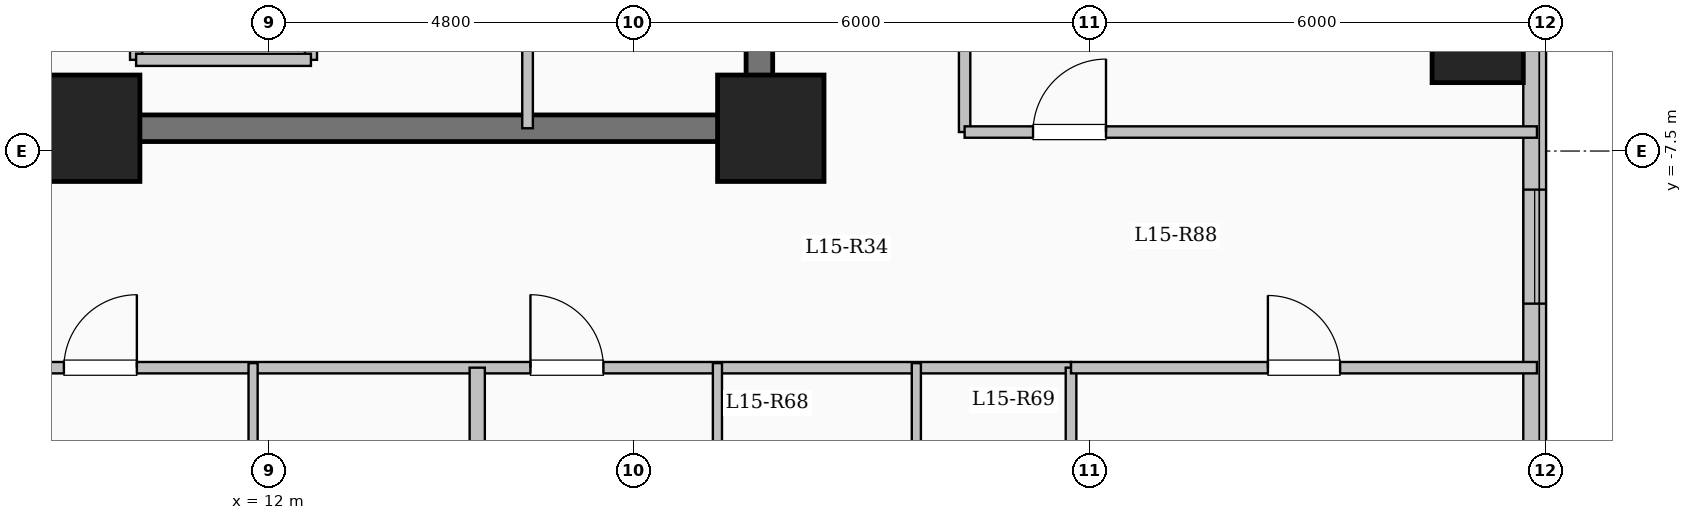
"""IFC4 building model, lengths in metres.
Left out: names, types, materials, properties, quantities, classifications, styles, units other than length and angle.
Written with IfcOpenShell. Run it as: python <this file> out.ifc"""

import sys

from ifc_helpers import new_model, si_unit, direction, frame, frame_2d, origin, origin_2d, place, context, subcontext, project, spatial, rectangle, extrude, element, fill, save


model = new_model("IFC4")
c1 = context("Model", 3, precision=1e-05, world=origin(), true_north=direction((0.0, 1.0)))
c2 = subcontext(c1, "Body", "Model", "MODEL_VIEW")
j1 = project(units=[si_unit("LENGTHUNIT", "METRE"), si_unit("PLANEANGLEUNIT", "RADIAN")], contexts=[c1])
p1 = place(None, origin())
s1 = spatial("IfcSite", under=j1, at=p1, CompositionType="ELEMENT")
p2 = place(p1, origin())
s2 = spatial("IfcBuilding", under=s1, at=p2, CompositionType="ELEMENT")
p3 = place(p2, frame((0.0, 0.0, 57.5)))
s3 = spatial("IfcBuildingStorey", under=s2, at=p3, CompositionType="ELEMENT", Elevation=57.5)
for number, where, z_axis, x_axis in (
    (1, (9.6, -7.2, 0.0), (0.0, 0.0, 1.0), (1.0, 0.0, 0.0)),
    (2, (18.6, -7.2, 0.0), (0.0, 0.0, 1.0), (1.0, 0.0, 0.0)),
):
    element("IfcColumn", number, at=place(p3, frame(where, z_axis=z_axis, x_axis=x_axis)), inside=s3, PredefinedType="COLUMN", context=c2, shape_type="SweptSolid", body=[
        extrude(rectangle(XDim=1.4, YDim=1.4, at=origin_2d()), origin(), (0.0, 0.0, 1.0), 3.35),
    ])
p4 = place(p3, frame((27.9, -6.0, 0.0), z_axis=(0.0, 0.0, 1.0), x_axis=(1.0, 0.0, 0.0)))
e3 = element("IfcColumn", 3, at=p4, inside=s3, PredefinedType="COLUMN", context=c2, shape_type="SweptSolid", body=[
    extrude(rectangle(XDim=1.2, YDim=1.2, at=origin_2d()), origin(), (0.0, 0.0, 1.0), 3.35),
])
p5 = place(p3, frame((28.65, 19.05, 0.0), z_axis=(0.0, 0.0, 1.0), x_axis=(0.0, -1.0, 0.0)))
e4 = element("IfcWall", 4, at=p5, inside=s3, PredefinedType="SOLIDWALL", context=c2, shape_type="SweptSolid", body=[
    extrude(rectangle(XDim=38.1, YDim=0.3, at=frame_2d((19.05, 0.0))), origin(), (0.0, 0.0, 1.0), 3.1),
])
p6 = place(p5, frame((2.275, 0.0, 0.9)))
e5 = element("IfcOpeningElement", 5, at=p6, cuts=e4, PredefinedType="OPENING", context=c2, shape_type="SweptSolid", body=[
    extrude(rectangle(XDim=2.0, YDim=1.7, at=frame_2d((1.0, 0.85))), frame((0.0, 0.16, 0.0), z_axis=(0.0, -1.0, 0.0), x_axis=(1.0, 0.0, 0.0)), (0.0, 0.0, 1.0), 0.32),
])
p7 = place(p5, frame((6.925, 0.0, 0.95)))
e6 = element("IfcOpeningElement", 6, at=p7, cuts=e4, PredefinedType="OPENING", context=c2, shape_type="SweptSolid", body=[
    extrude(rectangle(XDim=1.0, YDim=1.5, at=frame_2d((0.5, 0.75))), frame((0.0, 0.16, 0.0), z_axis=(0.0, -1.0, 0.0), x_axis=(1.0, 0.0, 0.0)), (0.0, 0.0, 1.0), 0.32),
])
p8 = place(p5, frame((10.175, 0.0, 0.9)))
e7 = element("IfcOpeningElement", 7, at=p8, cuts=e4, PredefinedType="OPENING", context=c2, shape_type="SweptSolid", body=[
    extrude(rectangle(XDim=2.0, YDim=1.7, at=frame_2d((1.0, 0.85))), frame((0.0, 0.16, 0.0), z_axis=(0.0, -1.0, 0.0), x_axis=(1.0, 0.0, 0.0)), (0.0, 0.0, 1.0), 0.32),
])
p9 = place(p5, frame((14.925, 0.0, 0.9)))
e8 = element("IfcOpeningElement", 8, at=p9, cuts=e4, PredefinedType="OPENING", context=c2, shape_type="SweptSolid", body=[
    extrude(rectangle(XDim=1.8, YDim=1.65, at=frame_2d((0.9, 0.825))), frame((0.0, 0.16, 0.0), z_axis=(0.0, -1.0, 0.0), x_axis=(1.0, 0.0, 0.0)), (0.0, 0.0, 1.0), 0.32),
])
p10 = place(p5, frame((20.75, 0.0, 0.9)))
e9 = element("IfcOpeningElement", 9, at=p10, cuts=e4, PredefinedType="OPENING", context=c2, shape_type="SweptSolid", body=[
    extrude(rectangle(XDim=2.4, YDim=1.8, at=frame_2d((1.2, 0.9))), frame((0.0, 0.16, 0.0), z_axis=(0.0, -1.0, 0.0), x_axis=(1.0, 0.0, 0.0)), (0.0, 0.0, 1.0), 0.32),
])
p11 = place(p5, frame((27.058, 0.0, 0.9)))
e10 = element("IfcOpeningElement", 10, at=p11, cuts=e4, PredefinedType="OPENING", context=c2, shape_type="SweptSolid", body=[
    extrude(rectangle(XDim=1.5, YDim=1.65, at=frame_2d((0.75, 0.825))), frame((0.0, 0.16, 0.0), z_axis=(0.0, -1.0, 0.0), x_axis=(1.0, 0.0, 0.0)), (0.0, 0.0, 1.0), 0.32),
])
p12 = place(p5, frame((32.55, 0.0, 0.9)))
e11 = element("IfcOpeningElement", 11, at=p12, cuts=e4, PredefinedType="OPENING", context=c2, shape_type="SweptSolid", body=[
    extrude(rectangle(XDim=2.4, YDim=1.8, at=frame_2d((1.2, 0.9))), frame((0.0, 0.16, 0.0), z_axis=(0.0, -1.0, 0.0), x_axis=(1.0, 0.0, 0.0)), (0.0, 0.0, 1.0), 0.32),
])
for number, where, z_axis, x_axis in (
    (12, (10.25, -6.3, 0.0), (0.0, 0.0, 1.0), (0.0, 1.0, 0.0)),
    (13, (12.55, -6.3, 0.0), (0.0, 0.0, 1.0), (0.0, 1.0, 0.0)),
):
    element("IfcWall", number, at=place(p3, frame(where, z_axis=z_axis, x_axis=x_axis)), inside=s3, PredefinedType="SOLIDWALL", context=c2, shape_type="SweptSolid", body=[
        extrude(rectangle(XDim=2.6, YDim=0.16, at=frame_2d((1.3, 0.0))), origin(), (0.0, 0.0, 1.0), 3.1),
    ])
p13 = place(p3, frame((10.25, -6.3, 0.0), z_axis=(0.0, 0.0, 1.0), x_axis=(1.0, 0.0, 0.0)))
e14 = element("IfcWall", 14, at=p13, inside=s3, PredefinedType="SOLIDWALL", context=c2, shape_type="SweptSolid", body=[
    extrude(rectangle(XDim=2.3, YDim=0.16, at=frame_2d((1.15, 0.0))), origin(), (0.0, 0.0, 1.0), 3.1),
])
p14 = place(p3, frame((18.45, -7.375, 0.0), z_axis=(0.0, 0.0, 1.0), x_axis=(0.0, 1.0, 0.0)))
e15 = element("IfcWall", 15, at=p14, inside=s3, PredefinedType="SHEAR", context=c2, shape_type="SweptSolid", body=[
    extrude(rectangle(XDim=14.05, YDim=0.35, at=frame_2d((7.025, 0.0))), origin(), (0.0, 0.0, 1.0), 3.35),
])
p15 = place(p3, frame((10.075, -7.2, 0.0), z_axis=(0.0, 0.0, 1.0), x_axis=(1.0, 0.0, 0.0)))
e16 = element("IfcWall", 16, at=p15, inside=s3, PredefinedType="SHEAR", context=c2, shape_type="SweptSolid", body=[
    extrude(rectangle(XDim=8.55, YDim=0.35, at=frame_2d((4.275, 0.0))), origin(), (0.0, 0.0, 1.0), 3.35),
])
p16 = place(p3, frame((15.4, -7.2, 0.0), z_axis=(0.0, 0.0, 1.0), x_axis=(0.0, 1.0, 0.0)))
e17 = element("IfcWall", 17, at=p16, inside=s3, PredefinedType="PARTITIONING", context=c2, shape_type="SweptSolid", body=[
    extrude(rectangle(XDim=10.45, YDim=0.14, at=frame_2d((5.225, 0.0))), origin(), (0.0, 0.0, 1.0), 3.1),
])
p17 = place(p16, frame((9.25, 0.0, 0.0)))
e18 = element("IfcOpeningElement", 18, at=p17, cuts=e17, PredefinedType="OPENING", context=c2, shape_type="SweptSolid", body=[
    extrude(rectangle(XDim=0.9, YDim=2.08, at=frame_2d((0.45, 1.04))), frame((0.0, 0.08, 0.0), z_axis=(0.0, -1.0, 0.0), x_axis=(1.0, 0.0, 0.0)), (0.0, 0.0, 1.0), 0.16),
])
p18 = place(p3, frame((21.15, -7.25, 0.0), z_axis=(0.0, 0.0, 1.0), x_axis=(0.0, 1.0, 0.0)))
e19 = element("IfcWall", 19, at=p18, inside=s3, PredefinedType="PARTITIONING", context=c2, shape_type="SweptSolid", body=[
    extrude(rectangle(XDim=18.0, YDim=0.15, at=frame_2d((9.0, 0.0))), origin(), (0.0, 0.0, 1.0), 2.585),
])
p19 = place(p3, frame((8.55, -10.35, 0.0), z_axis=(0.0, 0.0, 1.0), x_axis=(1.0, 0.0, 0.0)))
e20 = element("IfcWall", 20, at=p19, inside=s3, PredefinedType="PARTITIONING", context=c2, shape_type="SweptSolid", body=[
    extrude(rectangle(XDim=14.0, YDim=0.15, at=frame_2d((7.0, 0.0))), origin(), (0.0, 0.0, 1.0), 3.1),
])
p20 = place(p19, frame((0.75, 0.0, 0.0)))
e21 = element("IfcOpeningElement", 21, at=p20, cuts=e20, PredefinedType="OPENING", context=c2, shape_type="SweptSolid", body=[
    extrude(rectangle(XDim=0.96, YDim=2.15, at=frame_2d((0.48, 1.075))), frame((0.0, 0.085, 0.0), z_axis=(0.0, -1.0, 0.0), x_axis=(1.0, 0.0, 0.0)), (0.0, 0.0, 1.0), 0.17),
])
p21 = place(p19, frame((6.888, 0.0, 0.0)))
e22 = element("IfcOpeningElement", 22, at=p21, cuts=e20, PredefinedType="OPENING", context=c2, shape_type="SweptSolid", body=[
    extrude(rectangle(XDim=0.96, YDim=2.15, at=frame_2d((0.48, 1.075))), frame((0.0, 0.085, 0.0), z_axis=(0.0, -1.0, 0.0), x_axis=(1.0, 0.0, 0.0)), (0.0, 0.0, 1.0), 0.17),
])
p22 = place(p3, frame((14.738, -23.6, 0.0), z_axis=(0.0, 0.0, 1.0), x_axis=(0.0, 1.0, 0.0)))
e23 = element("IfcWall", 23, at=p22, inside=s3, PredefinedType="SOLIDWALL", context=c2, shape_type="SweptSolid", body=[
    extrude(rectangle(XDim=13.25, YDim=0.2, at=frame_2d((6.625, 0.0))), origin(), (0.0, 0.0, 1.0), 2.435),
])
p23 = place(p3, frame((11.789, -13.51, 0.0), z_axis=(0.0, 0.0, 1.0), x_axis=(0.0, 1.0, 0.0)))
e24 = element("IfcWall", 24, at=p23, inside=s3, PredefinedType="PARTITIONING", context=c2, shape_type="SweptSolid", body=[
    extrude(rectangle(XDim=3.22, YDim=0.12, at=frame_2d((1.61, 0.0))), origin(), (0.0, 0.0, 1.0), 3.1),
])
p24 = place(p23, frame((1.14, 0.0, 0.0)))
e25 = element("IfcOpeningElement", 25, at=p24, cuts=e24, PredefinedType="OPENING", context=c2, shape_type="SweptSolid", body=[
    extrude(rectangle(XDim=0.88, YDim=2.1, at=frame_2d((0.44, 1.05))), frame((0.0, 0.07, 0.0), z_axis=(0.0, -1.0, 0.0), x_axis=(1.0, 0.0, 0.0)), (0.0, 0.0, 1.0), 0.14),
])
p25 = place(p3, frame((17.898, -23.6, 0.0), z_axis=(0.0, 0.0, 1.0), x_axis=(0.0, 1.0, 0.0)))
e26 = element("IfcWall", 26, at=p25, inside=s3, PredefinedType="PARTITIONING", context=c2, shape_type="SweptSolid", body=[
    extrude(rectangle(XDim=13.31, YDim=0.12, at=frame_2d((6.655, 0.0))), origin(), (0.0, 0.0, 1.0), 3.1),
])
p26 = place(p25, frame((9.485, 0.0, 0.0)))
e27 = element("IfcOpeningElement", 27, at=p26, cuts=e26, PredefinedType="OPENING", context=c2, shape_type="SweptSolid", body=[
    extrude(rectangle(XDim=1.08, YDim=2.15, at=frame_2d((0.54, 1.075))), frame((0.0, 0.07, 0.0), z_axis=(0.0, -1.0, 0.0), x_axis=(1.0, 0.0, 0.0)), (0.0, 0.0, 1.0), 0.14),
])
p27 = place(p3, frame((20.515, -12.75, 0.0), z_axis=(0.0, 0.0, 1.0), x_axis=(0.0, 1.0, 0.0)))
e28 = element("IfcWall", 28, at=p27, inside=s3, PredefinedType="PARTITIONING", context=c2, shape_type="SweptSolid", body=[
    extrude(rectangle(XDim=2.46, YDim=0.12, at=frame_2d((1.23, 0.0))), origin(), (0.0, 0.0, 1.0), 3.1),
])
p28 = place(p3, frame((21.15, -7.25, 0.0), z_axis=(0.0, 0.0, 1.0), x_axis=(1.0, 0.0, 0.0)))
e29 = element("IfcWall", 29, at=p28, inside=s3, PredefinedType="PARTITIONING", context=c2, shape_type="SweptSolid", body=[
    extrude(rectangle(XDim=7.53, YDim=0.15, at=frame_2d((3.765, 0.0))), origin(), (0.0, 0.0, 1.0), 3.1),
])
p29 = place(p28, frame((0.9, 0.0, 0.0)))
e30 = element("IfcOpeningElement", 30, at=p29, cuts=e29, PredefinedType="OPENING", context=c2, shape_type="SweptSolid", body=[
    extrude(rectangle(XDim=0.96, YDim=2.15, at=frame_2d((0.48, 1.075))), frame((0.0, 0.085, 0.0), z_axis=(0.0, -1.0, 0.0), x_axis=(1.0, 0.0, 0.0)), (0.0, 0.0, 1.0), 0.17),
])
p30 = place(p3, frame((22.55, -19.05, 0.0), z_axis=(0.0, 0.0, 1.0), x_axis=(0.0, 1.0, 0.0)))
e31 = element("IfcWall", 31, at=p30, inside=s3, PredefinedType="PARTITIONING", context=c2, shape_type="SweptSolid", body=[
    extrude(rectangle(XDim=8.7, YDim=0.14, at=frame_2d((4.35, 0.0))), origin(), (0.0, 0.0, 1.0), 3.1),
])
p31 = place(p3, frame((22.55, -10.35, 0.0), z_axis=(0.0, 0.0, 1.0), x_axis=(1.0, 0.0, 0.0)))
e32 = element("IfcWall", 32, at=p31, inside=s3, PredefinedType="PARTITIONING", context=c2, shape_type="SweptSolid", body=[
    extrude(rectangle(XDim=6.13, YDim=0.15, at=frame_2d((3.065, 0.0))), origin(), (0.0, 0.0, 1.0), 3.1),
])
p32 = place(p31, frame((2.59, 0.0, 0.0)))
e33 = element("IfcOpeningElement", 33, at=p32, cuts=e32, PredefinedType="OPENING", context=c2, shape_type="SweptSolid", body=[
    extrude(rectangle(XDim=0.95, YDim=2.15, at=frame_2d((0.475, 1.075))), frame((0.0, 0.085, 0.0), z_axis=(0.0, -1.0, 0.0), x_axis=(1.0, 0.0, 0.0)), (0.0, 0.0, 1.0), 0.17),
])
p33 = place(p11, origin())
e34 = element("IfcWindow", 34, at=p33, inside=s3, PartitioningType="SINGLE_PANEL", PredefinedType="WINDOW", context=c2, shape_type="SweptSolid", body=[
    extrude(rectangle(XDim=1.5, YDim=1.65, at=frame_2d((0.75, 0.825))), frame((0.0, 0.03, 0.0), z_axis=(0.0, -1.0, 0.0), x_axis=(1.0, 0.0, 0.0)), (0.0, 0.0, 1.0), 0.06),
])
fill(e10, e34)
p34 = place(p20, origin())
e35 = element("IfcDoor", 35, at=p34, inside=s3, OperationType="SINGLE_SWING_RIGHT", PredefinedType="DOOR", context=c2, shape_type="SweptSolid", body=[
    extrude(rectangle(XDim=0.96, YDim=2.15, at=frame_2d((0.48, 1.075))), frame((0.0, 0.025, 0.0), z_axis=(0.0, -1.0, 0.0), x_axis=(1.0, 0.0, 0.0)), (0.0, 0.0, 1.0), 0.05),
])
fill(e21, e35)
p35 = place(p21, origin())
e36 = element("IfcDoor", 36, at=p35, inside=s3, OperationType="SINGLE_SWING_LEFT", PredefinedType="DOOR", context=c2, shape_type="SweptSolid", body=[
    extrude(rectangle(XDim=0.96, YDim=2.15, at=frame_2d((0.48, 1.075))), frame((0.0, 0.025, 0.0), z_axis=(0.0, -1.0, 0.0), x_axis=(1.0, 0.0, 0.0)), (0.0, 0.0, 1.0), 0.05),
])
fill(e22, e36)
p36 = place(p32, origin())
e37 = element("IfcDoor", 37, at=p36, inside=s3, OperationType="SINGLE_SWING_LEFT", PredefinedType="DOOR", context=c2, shape_type="SweptSolid", body=[
    extrude(rectangle(XDim=0.95, YDim=2.15, at=frame_2d((0.475, 1.075))), frame((0.0, 0.025, 0.0), z_axis=(0.0, -1.0, 0.0), x_axis=(1.0, 0.0, 0.0)), (0.0, 0.0, 1.0), 0.05),
])
fill(e33, e37)
p37 = place(p29, origin())
e38 = element("IfcDoor", 38, at=p37, inside=s3, OperationType="SINGLE_SWING_RIGHT", PredefinedType="DOOR", context=c2, shape_type="SweptSolid", body=[
    extrude(rectangle(XDim=0.96, YDim=2.15, at=frame_2d((0.48, 1.075))), frame((0.0, 0.025, 0.0), z_axis=(0.0, -1.0, 0.0), x_axis=(1.0, 0.0, 0.0)), (0.0, 0.0, 1.0), 0.05),
])
fill(e30, e38)
save(model, sys.argv[1])
